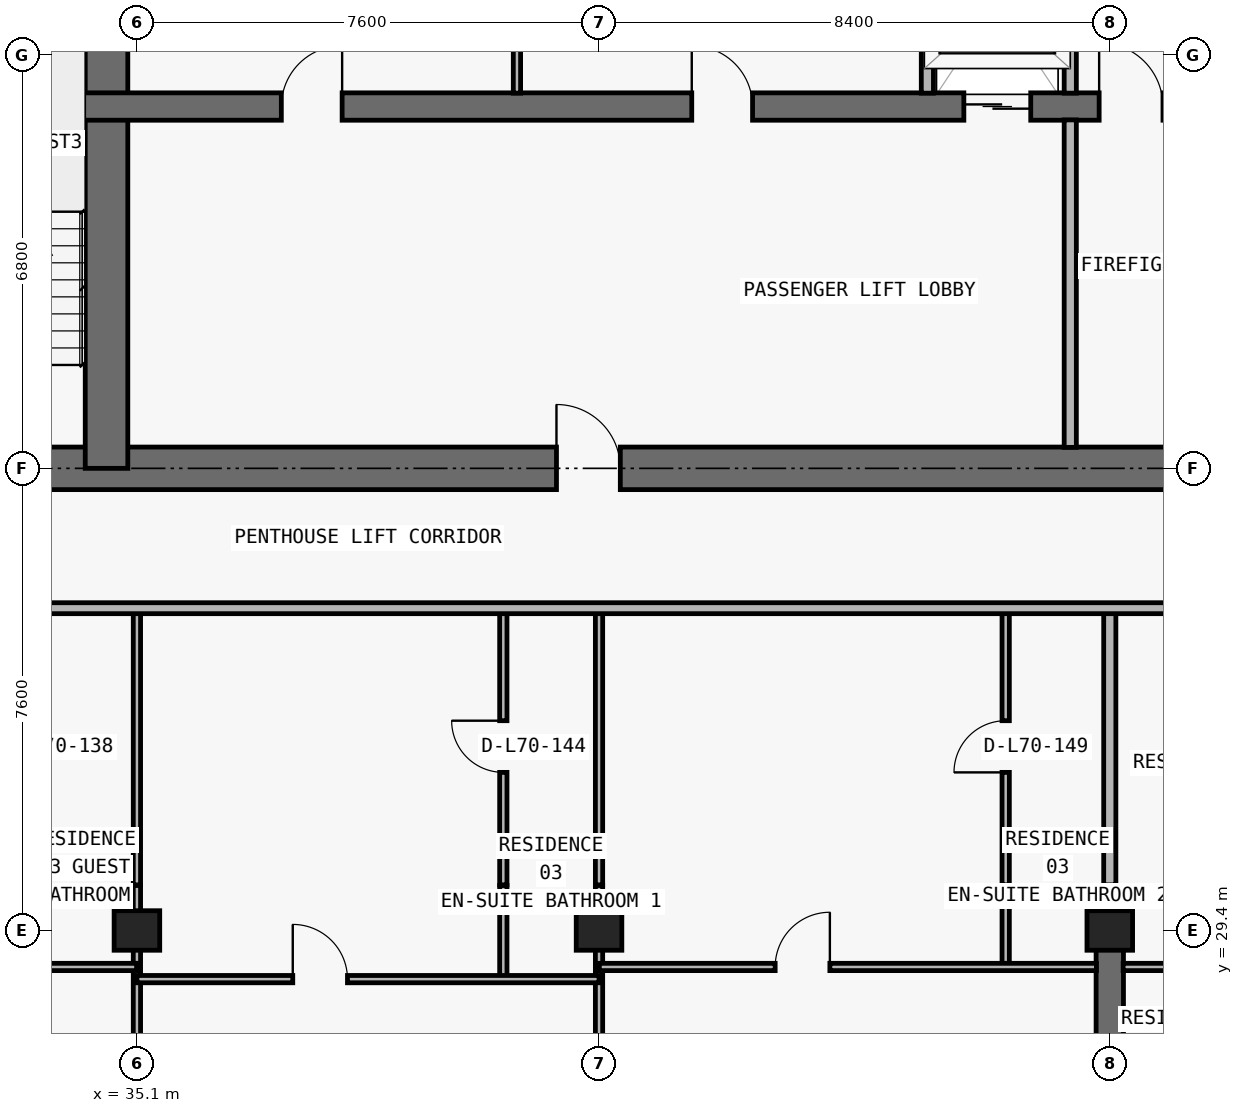
"""IFC4 building model, lengths in metres.
Left out: names, types, materials, properties, quantities, classifications, styles, units other than length and angle.
Written with IfcOpenShell. Run it as: python <this file> out.ifc"""

import sys

from ifc_helpers import new_model, si_unit, direction, frame, frame_2d, origin, origin_2d, place, context, subcontext, project, spatial, rectangle, extrude, element, fill, save


model = new_model("IFC4")
c1 = context("Model", 3, precision=1e-05, world=origin(), true_north=direction((0.0, 1.0)))
c2 = subcontext(c1, "Body", "Model", "MODEL_VIEW")
j1 = project(units=[si_unit("LENGTHUNIT", "METRE"), si_unit("PLANEANGLEUNIT", "RADIAN")], contexts=[c1])
p1 = place(None, origin())
s1 = spatial("IfcSite", under=j1, at=p1, CompositionType="ELEMENT")
p2 = place(p1, origin())
s2 = spatial("IfcBuilding", under=s1, at=p2, CompositionType="ELEMENT")
p3 = place(p2, frame((0.0, 0.0, 249.6)))
s3 = spatial("IfcBuildingStorey", under=s2, at=p3, CompositionType="ELEMENT", Elevation=249.6)
for number, where, z_axis, x_axis in (
    (1, (35.1, 29.4, 0.0), (0.0, 0.0, 1.0), (1.0, 0.0, 0.0)),
    (2, (42.7, 29.4, 0.0), (0.0, 0.0, 1.0), (1.0, 0.0, 0.0)),
    (3, (51.1, 29.4, 0.0), (0.0, 0.0, 1.0), (1.0, 0.0, 0.0)),
):
    element("IfcColumn", number, at=place(p3, frame(where, z_axis=z_axis, x_axis=x_axis)), inside=s3, PredefinedType="COLUMN", context=c2, shape_type="SweptSolid", body=[
        extrude(rectangle(XDim=0.75, YDim=0.65, at=origin_2d()), origin(), (0.0, 0.0, 1.0), 3.05),
    ])
p4 = place(p3, frame((17.95, 37.0, 0.0), z_axis=(0.0, 0.0, 1.0), x_axis=(1.0, 0.0, 0.0)))
e4 = element("IfcWall", 4, at=p4, inside=s3, PredefinedType="SHEAR", context=c2, shape_type="SweptSolid", body=[
    extrude(rectangle(XDim=41.9, YDim=0.7, at=frame_2d((20.95, 0.0))), origin(), (0.0, 0.0, 1.0), 3.05),
])
p5 = place(p4, frame((14.35, 0.0, 0.0)))
e5 = element("IfcOpeningElement", 5, at=p5, cuts=e4, PredefinedType="OPENING", context=c2, shape_type="SweptSolid", body=[
    extrude(rectangle(XDim=1.1, YDim=2.15, at=frame_2d((0.55, 1.075))), frame((0.0, 0.36, 0.0), z_axis=(0.0, -1.0, 0.0), x_axis=(1.0, 0.0, 0.0)), (0.0, 0.0, 1.0), 0.72),
])
p6 = place(p4, frame((6.2, 0.0, 0.0)))
e6 = element("IfcOpeningElement", 6, at=p6, cuts=e4, PredefinedType="OPENING", context=c2, shape_type="SweptSolid", body=[
    extrude(rectangle(XDim=1.05, YDim=2.15, at=frame_2d((0.525, 1.075))), frame((0.0, 0.36, 0.0), z_axis=(0.0, -1.0, 0.0), x_axis=(1.0, 0.0, 0.0)), (0.0, 0.0, 1.0), 0.72),
])
p7 = place(p4, frame((34.7, 0.0, 0.0)))
e7 = element("IfcOpeningElement", 7, at=p7, cuts=e4, PredefinedType="OPENING", context=c2, shape_type="SweptSolid", body=[
    extrude(rectangle(XDim=1.05, YDim=2.15, at=frame_2d((0.525, 1.075))), frame((0.0, 0.36, 0.0), z_axis=(0.0, -1.0, 0.0), x_axis=(1.0, 0.0, 0.0)), (0.0, 0.0, 1.0), 0.72),
])
p8 = place(p4, frame((10.812, 0.0, 0.0)))
e8 = element("IfcOpeningElement", 8, at=p8, cuts=e4, PredefinedType="OPENING", context=c2, shape_type="SweptSolid", body=[
    extrude(rectangle(XDim=1.05, YDim=2.15, at=frame_2d((0.525, 1.075))), frame((0.0, 0.36, 0.0), z_axis=(0.0, -1.0, 0.0), x_axis=(1.0, 0.0, 0.0)), (0.0, 0.0, 1.0), 0.72),
])
p9 = place(p4, frame((24.05, 0.0, 0.0)))
e9 = element("IfcOpeningElement", 9, at=p9, cuts=e4, PredefinedType="OPENING", context=c2, shape_type="SweptSolid", body=[
    extrude(rectangle(XDim=1.05, YDim=2.15, at=frame_2d((0.525, 1.075))), frame((0.0, 0.36, 0.0), z_axis=(0.0, -1.0, 0.0), x_axis=(1.0, 0.0, 0.0)), (0.0, 0.0, 1.0), 0.72),
])
p10 = place(p3, frame((34.6, 37.0, 0.0), z_axis=(0.0, 0.0, 1.0), x_axis=(0.0, 1.0, 0.0)))
e10 = element("IfcWall", 10, at=p10, inside=s3, PredefinedType="SHEAR", context=c2, shape_type="SweptSolid", body=[
    extrude(rectangle(XDim=9.575, YDim=0.7, at=frame_2d((4.788, 0.0))), origin(), (0.0, 0.0, 1.0), 3.05),
])
p11 = place(p3, frame((22.25, 42.95, 0.0), z_axis=(0.0, 0.0, 1.0), x_axis=(1.0, 0.0, 0.0)))
e11 = element("IfcWall", 11, at=p11, inside=s3, PredefinedType="SHEAR", context=c2, shape_type="SweptSolid", body=[
    extrude(rectangle(XDim=33.3, YDim=0.45, at=frame_2d((16.65, 0.0))), origin(), (0.0, 0.0, 1.0), 3.05),
])
p12 = place(p11, frame((1.05, 0.0, 0.0)))
e12 = element("IfcOpeningElement", 12, at=p12, cuts=e11, PredefinedType="OPENING", context=c2, shape_type="SweptSolid", body=[
    extrude(rectangle(XDim=1.2, YDim=2.2, at=frame_2d((0.6, 1.1))), frame((0.0, 0.235, 0.0), z_axis=(0.0, -1.0, 0.0), x_axis=(1.0, 0.0, 0.0)), (0.0, 0.0, 1.0), 0.47),
])
p13 = place(p11, frame((31.05, 0.0, 0.0)))
e13 = element("IfcOpeningElement", 13, at=p13, cuts=e11, PredefinedType="OPENING", context=c2, shape_type="SweptSolid", body=[
    extrude(rectangle(XDim=1.2, YDim=2.2, at=frame_2d((0.6, 1.1))), frame((0.0, 0.235, 0.0), z_axis=(0.0, -1.0, 0.0), x_axis=(1.0, 0.0, 0.0)), (0.0, 0.0, 1.0), 0.47),
])
p14 = place(p11, frame((26.45, 0.0, 0.0)))
e14 = element("IfcOpeningElement", 14, at=p14, cuts=e11, PredefinedType="OPENING", context=c2, shape_type="SweptSolid", body=[
    extrude(rectangle(XDim=1.1, YDim=2.2, at=frame_2d((0.55, 1.1))), frame((0.0, 0.235, 0.0), z_axis=(0.0, -1.0, 0.0), x_axis=(1.0, 0.0, 0.0)), (0.0, 0.0, 1.0), 0.47),
])
p15 = place(p11, frame((5.95, 0.0, 0.0)))
e15 = element("IfcOpeningElement", 15, at=p15, cuts=e11, PredefinedType="OPENING", context=c2, shape_type="SweptSolid", body=[
    extrude(rectangle(XDim=1.1, YDim=2.2, at=frame_2d((0.55, 1.1))), frame((0.0, 0.235, 0.0), z_axis=(0.0, -1.0, 0.0), x_axis=(1.0, 0.0, 0.0)), (0.0, 0.0, 1.0), 0.47),
])
p16 = place(p11, frame((3.625, 0.0, 0.0)))
e16 = element("IfcOpeningElement", 16, at=p16, cuts=e11, PredefinedType="OPENING", context=c2, shape_type="SweptSolid", body=[
    extrude(rectangle(XDim=1.05, YDim=2.15, at=frame_2d((0.525, 1.075))), frame((0.0, 0.235, 0.0), z_axis=(0.0, -1.0, 0.0), x_axis=(1.0, 0.0, 0.0)), (0.0, 0.0, 1.0), 0.47),
])
p17 = place(p11, frame((28.675, 0.0, 0.0)))
e17 = element("IfcOpeningElement", 17, at=p17, cuts=e11, PredefinedType="OPENING", context=c2, shape_type="SweptSolid", body=[
    extrude(rectangle(XDim=1.05, YDim=2.15, at=frame_2d((0.525, 1.075))), frame((0.0, 0.235, 0.0), z_axis=(0.0, -1.0, 0.0), x_axis=(1.0, 0.0, 0.0)), (0.0, 0.0, 1.0), 0.47),
])
p18 = place(p11, frame((15.225, 0.0, 0.0)))
e18 = element("IfcOpeningElement", 18, at=p18, cuts=e11, PredefinedType="OPENING", context=c2, shape_type="SweptSolid", body=[
    extrude(rectangle(XDim=1.0, YDim=2.2, at=frame_2d((0.5, 1.1))), frame((0.0, 0.235, 0.0), z_axis=(0.0, -1.0, 0.0), x_axis=(1.0, 0.0, 0.0)), (0.0, 0.0, 1.0), 0.47),
])
p19 = place(p11, frame((21.975, 0.0, 0.0)))
e19 = element("IfcOpeningElement", 19, at=p19, cuts=e11, PredefinedType="OPENING", context=c2, shape_type="SweptSolid", body=[
    extrude(rectangle(XDim=1.0, YDim=2.2, at=frame_2d((0.5, 1.1))), frame((0.0, 0.235, 0.0), z_axis=(0.0, -1.0, 0.0), x_axis=(1.0, 0.0, 0.0)), (0.0, 0.0, 1.0), 0.47),
])
p20 = place(p3, frame((51.1, 20.8, 0.0), z_axis=(0.0, 0.0, 1.0), x_axis=(0.0, 1.0, 0.0)))
e20 = element("IfcWall", 20, at=p20, inside=s3, PredefinedType="SHEAR", context=c2, shape_type="SweptSolid", body=[
    extrude(rectangle(XDim=8.6, YDim=0.45, at=frame_2d((4.3, 0.0))), origin(), (0.0, 0.0, 1.0), 3.05),
])
p21 = place(p3, frame((35.1, 13.34, 0.0), z_axis=(0.0, 0.0, 1.0), x_axis=(0.0, 1.0, 0.0)))
e21 = element("IfcWall", 21, at=p21, inside=s3, PredefinedType="PARTITIONING", context=c2, shape_type="SweptSolid", body=[
    extrude(rectangle(XDim=16.8, YDim=0.12, at=frame_2d((8.4, 0.0))), origin(), (0.0, 0.0, 1.0), 2.263),
])
p22 = place(p21, frame((12.61, 0.0, 0.0)))
e22 = element("IfcOpeningElement", 22, at=p22, cuts=e21, PredefinedType="OPENING", context=c2, shape_type="SweptSolid", body=[
    extrude(rectangle(XDim=0.9, YDim=2.15, at=frame_2d((0.45, 1.075))), frame((0.0, 0.07, 0.0), z_axis=(0.0, -1.0, 0.0), x_axis=(1.0, 0.0, 0.0)), (0.0, 0.0, 1.0), 0.14),
])
p23 = place(p3, frame((35.1, 30.15, 0.0), z_axis=(0.0, 0.0, 1.0), x_axis=(0.0, 1.0, 0.0)))
e23 = element("IfcWall", 23, at=p23, inside=s3, PredefinedType="PARTITIONING", context=c2, shape_type="SweptSolid", body=[
    extrude(rectangle(XDim=4.55, YDim=0.12, at=frame_2d((2.275, 0.0))), origin(), (0.0, 0.0, 1.0), 2.263),
])
p24 = place(p3, frame((41.126, 28.6, 0.0), z_axis=(0.0, 0.0, 1.0), x_axis=(0.0, 1.0, 0.0)))
e24 = element("IfcWall", 24, at=p24, inside=s3, PredefinedType="PARTITIONING", context=c2, shape_type="SweptSolid", body=[
    extrude(rectangle(XDim=1.54, YDim=0.12, at=frame_2d((0.77, 0.0))), origin(), (0.0, 0.0, 1.0), 3.05),
])
p25 = place(p3, frame((41.126, 30.15, 0.0), z_axis=(0.0, 0.0, 1.0), x_axis=(0.0, 1.0, 0.0)))
e25 = element("IfcWall", 25, at=p25, inside=s3, PredefinedType="PARTITIONING", context=c2, shape_type="SweptSolid", body=[
    extrude(rectangle(XDim=4.55, YDim=0.12, at=frame_2d((2.275, 0.0))), origin(), (0.0, 0.0, 1.0), 3.05),
])
p26 = place(p25, frame((1.85, 0.0, 0.0)))
e26 = element("IfcOpeningElement", 26, at=p26, cuts=e25, PredefinedType="OPENING", context=c2, shape_type="SweptSolid", body=[
    extrude(rectangle(XDim=0.85, YDim=2.1, at=frame_2d((0.425, 1.05))), frame((0.0, 0.07, 0.0), z_axis=(0.0, -1.0, 0.0), x_axis=(1.0, 0.0, 0.0)), (0.0, 0.0, 1.0), 0.14),
])
p27 = place(p3, frame((41.35, 43.17, 0.0), z_axis=(0.0, 0.0, 1.0), x_axis=(0.0, 1.0, 0.0)))
e27 = element("IfcWall", 27, at=p27, inside=s3, PredefinedType="PARTITIONING", context=c2, shape_type="SweptSolid", body=[
    extrude(rectangle(XDim=3.185, YDim=0.12, at=frame_2d((1.593, 0.0))), origin(), (0.0, 0.0, 1.0), 3.05),
])
p28 = place(p3, frame((42.7, 13.34, 0.0), z_axis=(0.0, 0.0, 1.0), x_axis=(0.0, 1.0, 0.0)))
e28 = element("IfcWall", 28, at=p28, inside=s3, PredefinedType="PARTITIONING", context=c2, shape_type="SweptSolid", body=[
    extrude(rectangle(XDim=16.8, YDim=0.12, at=frame_2d((8.4, 0.0))), origin(), (0.0, 0.0, 1.0), 2.263),
])
p29 = place(p28, frame((12.61, 0.0, 0.0)))
e29 = element("IfcOpeningElement", 29, at=p29, cuts=e28, PredefinedType="OPENING", context=c2, shape_type="SweptSolid", body=[
    extrude(rectangle(XDim=0.9, YDim=2.15, at=frame_2d((0.45, 1.075))), frame((0.0, 0.07, 0.0), z_axis=(0.0, -1.0, 0.0), x_axis=(1.0, 0.0, 0.0)), (0.0, 0.0, 1.0), 0.14),
])
p30 = place(p3, frame((42.7, 30.15, 0.0), z_axis=(0.0, 0.0, 1.0), x_axis=(0.0, 1.0, 0.0)))
e30 = element("IfcWall", 30, at=p30, inside=s3, PredefinedType="PARTITIONING", context=c2, shape_type="SweptSolid", body=[
    extrude(rectangle(XDim=4.55, YDim=0.12, at=frame_2d((2.275, 0.0))), origin(), (0.0, 0.0, 1.0), 2.263),
])
p31 = place(p3, frame((48.1, 43.17, 0.0), z_axis=(0.0, 0.0, 1.0), x_axis=(0.0, 1.0, 0.0)))
e31 = element("IfcWall", 31, at=p31, inside=s3, PredefinedType="PARTITIONING", context=c2, shape_type="SweptSolid", body=[
    extrude(rectangle(XDim=3.185, YDim=0.2, at=frame_2d((1.593, 0.0))), origin(), (0.0, 0.0, 1.0), 3.05),
])
p32 = place(p3, frame((49.388, 28.8, 0.0), z_axis=(0.0, 0.0, 1.0), x_axis=(0.0, 1.0, 0.0)))
e32 = element("IfcWall", 32, at=p32, inside=s3, PredefinedType="PARTITIONING", context=c2, shape_type="SweptSolid", body=[
    extrude(rectangle(XDim=1.34, YDim=0.12, at=frame_2d((0.67, 0.0))), origin(), (0.0, 0.0, 1.0), 3.05),
])
p33 = place(p3, frame((49.388, 30.15, 0.0), z_axis=(0.0, 0.0, 1.0), x_axis=(0.0, 1.0, 0.0)))
e33 = element("IfcWall", 33, at=p33, inside=s3, PredefinedType="PARTITIONING", context=c2, shape_type="SweptSolid", body=[
    extrude(rectangle(XDim=4.55, YDim=0.12, at=frame_2d((2.275, 0.0))), origin(), (0.0, 0.0, 1.0), 3.05),
])
p34 = place(p33, frame((1.85, 0.0, 0.0)))
e34 = element("IfcOpeningElement", 34, at=p34, cuts=e33, PredefinedType="OPENING", context=c2, shape_type="SweptSolid", body=[
    extrude(rectangle(XDim=0.85, YDim=2.1, at=frame_2d((0.425, 1.05))), frame((0.0, 0.07, 0.0), z_axis=(0.0, -1.0, 0.0), x_axis=(1.0, 0.0, 0.0)), (0.0, 0.0, 1.0), 0.14),
])
p35 = place(p3, frame((50.45, 37.345, 0.0), z_axis=(0.0, 0.0, 1.0), x_axis=(0.0, 1.0, 0.0)))
e35 = element("IfcWall", 35, at=p35, inside=s3, PredefinedType="PARTITIONING", context=c2, shape_type="SweptSolid", body=[
    extrude(rectangle(XDim=5.385, YDim=0.2, at=frame_2d((2.692, 0.0))), origin(), (0.0, 0.0, 1.0), 3.05),
])
p36 = place(p3, frame((50.45, 43.17, 0.0), z_axis=(0.0, 0.0, 1.0), x_axis=(0.0, 1.0, 0.0)))
e36 = element("IfcWall", 36, at=p36, inside=s3, PredefinedType="PARTITIONING", context=c2, shape_type="SweptSolid", body=[
    extrude(rectangle(XDim=3.185, YDim=0.2, at=frame_2d((1.593, 0.0))), origin(), (0.0, 0.0, 1.0), 3.05),
])
p37 = place(p3, frame((51.1, 29.405, 0.0), z_axis=(0.0, 0.0, 1.0), x_axis=(0.0, 1.0, 0.0)))
e37 = element("IfcWall", 37, at=p37, inside=s3, PredefinedType="PARTITIONING", context=c2, shape_type="SweptSolid", body=[
    extrude(rectangle(XDim=0.735, YDim=0.2, at=frame_2d((0.367, 0.0))), origin(), (0.0, 0.0, 1.0), 2.335),
])
p38 = place(p3, frame((51.1, 30.15, 0.0), z_axis=(0.0, 0.0, 1.0), x_axis=(0.0, 1.0, 0.0)))
e38 = element("IfcWall", 38, at=p38, inside=s3, PredefinedType="PARTITIONING", context=c2, shape_type="SweptSolid", body=[
    extrude(rectangle(XDim=4.55, YDim=0.2, at=frame_2d((2.275, 0.0))), origin(), (0.0, 0.0, 1.0), 2.335),
])
p39 = place(p3, frame((35.1, 28.6, 0.0), z_axis=(0.0, 0.0, 1.0), x_axis=(1.0, 0.0, 0.0)))
e39 = element("IfcWall", 39, at=p39, inside=s3, PredefinedType="PARTITIONING", context=c2, shape_type="SweptSolid", body=[
    extrude(rectangle(XDim=7.6, YDim=0.12, at=frame_2d((3.8, 0.0))), origin(), (0.0, 0.0, 1.0), 3.05),
])
p40 = place(p39, frame((2.563, 0.0, 0.0)))
e40 = element("IfcOpeningElement", 40, at=p40, cuts=e39, PredefinedType="OPENING", context=c2, shape_type="SweptSolid", body=[
    extrude(rectangle(XDim=0.9, YDim=2.15, at=frame_2d((0.45, 1.075))), frame((0.0, 0.07, 0.0), z_axis=(0.0, -1.0, 0.0), x_axis=(1.0, 0.0, 0.0)), (0.0, 0.0, 1.0), 0.14),
])
p41 = place(p3, frame((26.92, 28.8, 0.0), z_axis=(0.0, 0.0, 1.0), x_axis=(1.0, 0.0, 0.0)))
e41 = element("IfcWall", 41, at=p41, inside=s3, PredefinedType="PARTITIONING", context=c2, shape_type="SweptSolid", body=[
    extrude(rectangle(XDim=8.175, YDim=0.12, at=frame_2d((4.087, 0.0))), origin(), (0.0, 0.0, 1.0), 3.05),
])
p42 = place(p41, frame((1.33, 0.0, 0.0)))
e42 = element("IfcOpeningElement", 42, at=p42, cuts=e41, PredefinedType="OPENING", context=c2, shape_type="SweptSolid", body=[
    extrude(rectangle(XDim=0.9, YDim=2.15, at=frame_2d((0.45, 1.075))), frame((0.0, 0.07, 0.0), z_axis=(0.0, -1.0, 0.0), x_axis=(1.0, 0.0, 0.0)), (0.0, 0.0, 1.0), 0.14),
])
p43 = place(p3, frame((42.705, 28.8, 0.0), z_axis=(0.0, 0.0, 1.0), x_axis=(1.0, 0.0, 0.0)))
e43 = element("IfcWall", 43, at=p43, inside=s3, PredefinedType="PARTITIONING", context=c2, shape_type="SweptSolid", body=[
    extrude(rectangle(XDim=8.175, YDim=0.12, at=frame_2d((4.087, 0.0))), origin(), (0.0, 0.0, 1.0), 3.05),
])
p44 = place(p43, frame((2.892, 0.0, 0.0)))
e44 = element("IfcOpeningElement", 44, at=p44, cuts=e43, PredefinedType="OPENING", context=c2, shape_type="SweptSolid", body=[
    extrude(rectangle(XDim=0.9, YDim=2.15, at=frame_2d((0.45, 1.075))), frame((0.0, 0.07, 0.0), z_axis=(0.0, -1.0, 0.0), x_axis=(1.0, 0.0, 0.0)), (0.0, 0.0, 1.0), 0.14),
])
p45 = place(p3, frame((51.32, 28.8, 0.0), z_axis=(0.0, 0.0, 1.0), x_axis=(1.0, 0.0, 0.0)))
e45 = element("IfcWall", 45, at=p45, inside=s3, PredefinedType="PARTITIONING", context=c2, shape_type="SweptSolid", body=[
    extrude(rectangle(XDim=8.175, YDim=0.12, at=frame_2d((4.087, 0.0))), origin(), (0.0, 0.0, 1.0), 3.05),
])
p46 = place(p45, frame((1.204, 0.0, 0.0)))
e46 = element("IfcOpeningElement", 46, at=p46, cuts=e45, PredefinedType="OPENING", context=c2, shape_type="SweptSolid", body=[
    extrude(rectangle(XDim=0.9, YDim=2.15, at=frame_2d((0.45, 1.075))), frame((0.0, 0.07, 0.0), z_axis=(0.0, -1.0, 0.0), x_axis=(1.0, 0.0, 0.0)), (0.0, 0.0, 1.0), 0.14),
])
p47 = place(p3, frame((26.7, 34.7, 0.0), z_axis=(0.0, 0.0, 1.0), x_axis=(1.0, 0.0, 0.0)))
e47 = element("IfcWall", 47, at=p47, inside=s3, PredefinedType="PARTITIONING", context=c2, shape_type="SweptSolid", body=[
    extrude(rectangle(XDim=39.0, YDim=0.18, at=frame_2d((19.5, 0.0))), origin(), (0.0, 0.0, 1.0), 3.05),
])
p48 = place(p47, frame((2.827, 0.0, 0.0)))
e48 = element("IfcOpeningElement", 48, at=p48, cuts=e47, PredefinedType="OPENING", context=c2, shape_type="SweptSolid", body=[
    extrude(rectangle(XDim=1.0, YDim=2.2, at=frame_2d((0.5, 1.1))), frame((0.0, 0.1, 0.0), z_axis=(0.0, -1.0, 0.0), x_axis=(1.0, 0.0, 0.0)), (0.0, 0.0, 1.0), 0.2),
])
p49 = place(p47, frame((27.27, 0.0, 0.0)))
e49 = element("IfcOpeningElement", 49, at=p49, cuts=e47, PredefinedType="OPENING", context=c2, shape_type="SweptSolid", body=[
    extrude(rectangle(XDim=1.0, YDim=2.2, at=frame_2d((0.5, 1.1))), frame((0.0, 0.1, 0.0), z_axis=(0.0, -1.0, 0.0), x_axis=(1.0, 0.0, 0.0)), (0.0, 0.0, 1.0), 0.2),
])
p50 = place(p14, origin())
e50 = element("IfcDoor", 50, at=p50, inside=s3, OperationType="DOUBLE_DOOR_SLIDING", PredefinedType="DOOR", context=c2, shape_type="SweptSolid", body=[
    extrude(rectangle(XDim=1.1, YDim=2.2, at=frame_2d((0.55, 1.1))), frame((0.0, 0.025, 0.0), z_axis=(0.0, -1.0, 0.0), x_axis=(1.0, 0.0, 0.0)), (0.0, 0.0, 1.0), 0.05),
])
fill(e14, e50)
p51 = place(p17, origin())
e51 = element("IfcDoor", 51, at=p51, inside=s3, OperationType="SINGLE_SWING_LEFT", PredefinedType="DOOR", context=c2, shape_type="SweptSolid", body=[
    extrude(rectangle(XDim=1.05, YDim=2.15, at=frame_2d((0.525, 1.075))), frame((0.0, 0.025, 0.0), z_axis=(0.0, -1.0, 0.0), x_axis=(1.0, 0.0, 0.0)), (0.0, 0.0, 1.0), 0.05),
])
fill(e17, e51)
p52 = place(p9, origin())
e52 = element("IfcDoor", 52, at=p52, inside=s3, OperationType="SINGLE_SWING_LEFT", PredefinedType="DOOR", context=c2, shape_type="SweptSolid", body=[
    extrude(rectangle(XDim=1.05, YDim=2.15, at=frame_2d((0.525, 1.075))), frame((0.0, 0.025, 0.0), z_axis=(0.0, -1.0, 0.0), x_axis=(1.0, 0.0, 0.0)), (0.0, 0.0, 1.0), 0.05),
])
fill(e9, e52)
p53 = place(p18, origin())
e53 = element("IfcDoor", 53, at=p53, inside=s3, OperationType="SINGLE_SWING_RIGHT", PredefinedType="DOOR", context=c2, shape_type="SweptSolid", body=[
    extrude(rectangle(XDim=1.0, YDim=2.2, at=frame_2d((0.5, 1.1))), frame((0.0, 0.025, 0.0), z_axis=(0.0, -1.0, 0.0), x_axis=(1.0, 0.0, 0.0)), (0.0, 0.0, 1.0), 0.05),
])
fill(e18, e53)
p54 = place(p19, origin())
e54 = element("IfcDoor", 54, at=p54, inside=s3, OperationType="SINGLE_SWING_LEFT", PredefinedType="DOOR", context=c2, shape_type="SweptSolid", body=[
    extrude(rectangle(XDim=1.0, YDim=2.2, at=frame_2d((0.5, 1.1))), frame((0.0, 0.025, 0.0), z_axis=(0.0, -1.0, 0.0), x_axis=(1.0, 0.0, 0.0)), (0.0, 0.0, 1.0), 0.05),
])
fill(e19, e54)
p55 = place(p40, origin())
e55 = element("IfcDoor", 55, at=p55, inside=s3, OperationType="SINGLE_SWING_LEFT", PredefinedType="DOOR", context=c2, shape_type="SweptSolid", body=[
    extrude(rectangle(XDim=0.9, YDim=2.15, at=frame_2d((0.45, 1.075))), frame((0.0, 0.025, 0.0), z_axis=(0.0, -1.0, 0.0), x_axis=(1.0, 0.0, 0.0)), (0.0, 0.0, 1.0), 0.05),
])
fill(e40, e55)
p56 = place(p26, origin())
e56 = element("IfcDoor", 56, at=p56, inside=s3, OperationType="SINGLE_SWING_RIGHT", PredefinedType="DOOR", context=c2, shape_type="SweptSolid", body=[
    extrude(rectangle(XDim=0.85, YDim=2.1, at=frame_2d((0.425, 1.05))), frame((0.0, 0.025, 0.0), z_axis=(0.0, -1.0, 0.0), x_axis=(1.0, 0.0, 0.0)), (0.0, 0.0, 1.0), 0.05),
])
fill(e26, e56)
p57 = place(p44, origin())
e57 = element("IfcDoor", 57, at=p57, inside=s3, OperationType="SINGLE_SWING_RIGHT", PredefinedType="DOOR", context=c2, shape_type="SweptSolid", body=[
    extrude(rectangle(XDim=0.9, YDim=2.15, at=frame_2d((0.45, 1.075))), frame((0.0, 0.025, 0.0), z_axis=(0.0, -1.0, 0.0), x_axis=(1.0, 0.0, 0.0)), (0.0, 0.0, 1.0), 0.05),
])
fill(e44, e57)
p58 = place(p34, origin())
e58 = element("IfcDoor", 58, at=p58, inside=s3, OperationType="SINGLE_SWING_LEFT", PredefinedType="DOOR", context=c2, shape_type="SweptSolid", body=[
    extrude(rectangle(XDim=0.85, YDim=2.1, at=frame_2d((0.425, 1.05))), frame((0.0, 0.025, 0.0), z_axis=(0.0, -1.0, 0.0), x_axis=(1.0, 0.0, 0.0)), (0.0, 0.0, 1.0), 0.05),
])
fill(e34, e58)
save(model, sys.argv[1])
